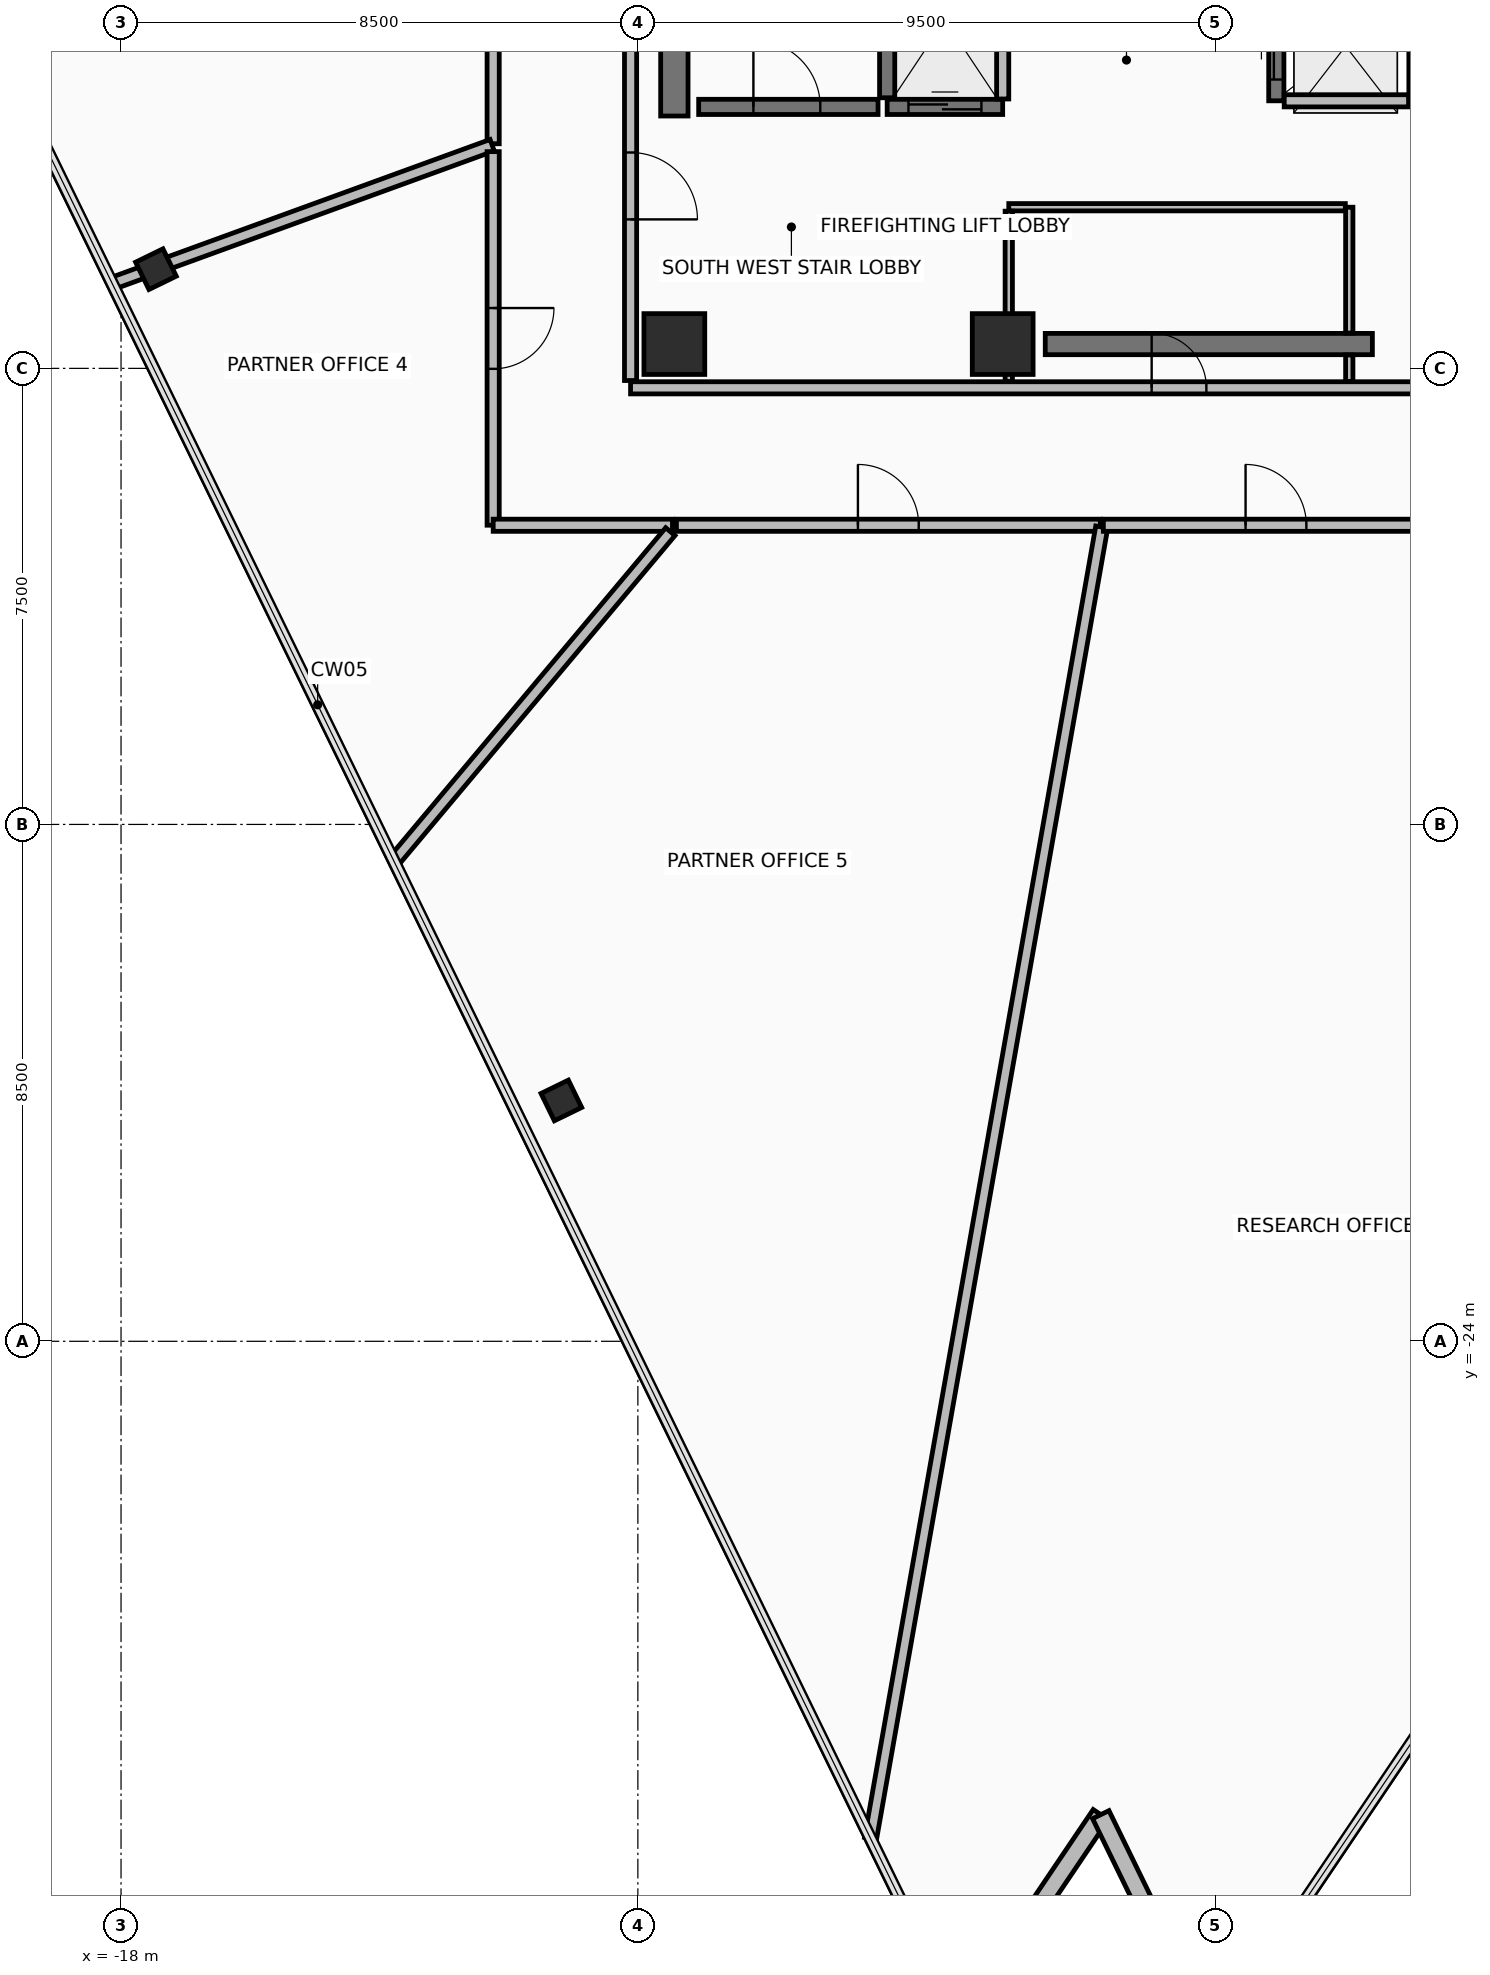
"""IFC4 building model, lengths in metres.
Left out: names, types, materials, properties, quantities, classifications, styles, units other than length and angle.
Written with IfcOpenShell. Run it as: python <this file> out.ifc"""

import sys

from ifc_helpers import new_model, si_unit, direction, frame, frame_2d, origin, origin_2d, place, context, subcontext, project, spatial, rectangle, hollow_rectangle, extrude, element, fill, save


model = new_model("IFC4")
c1 = context("Model", 3, precision=1e-05, world=origin(), true_north=direction((0.0, 1.0)))
c2 = subcontext(c1, "Body", "Model", "MODEL_VIEW")
j1 = project(units=[si_unit("LENGTHUNIT", "METRE"), si_unit("PLANEANGLEUNIT", "RADIAN")], contexts=[c1])
p1 = place(None, origin())
s1 = spatial("IfcSite", under=j1, at=p1, CompositionType="ELEMENT")
p2 = place(p1, origin())
s2 = spatial("IfcBuilding", under=s1, at=p2, CompositionType="ELEMENT")
p3 = place(p2, frame((0.0, 0.0, 237.85)))
s3 = spatial("IfcBuildingStorey", under=s2, at=p3, CompositionType="ELEMENT", Elevation=237.85)
for number, where, z_axis, x_axis in (
    (1, (-8.9, -7.6, 0.0), (0.0, 0.0, 1.0), (1.0, 0.0, 0.0)),
    (2, (-3.5, -7.6, 0.0), (0.0, 0.0, 1.0), (1.0, 0.0, 0.0)),
):
    element("IfcColumn", number, at=place(p3, frame(where, z_axis=z_axis, x_axis=x_axis)), inside=s3, PredefinedType="COLUMN", context=c2, shape_type="SweptSolid", body=[
        extrude(rectangle(XDim=1.0, YDim=1.0, at=origin_2d()), origin(), (0.0, 0.0, 1.0), 3.6),
    ])
for number, where, z_axis, x_axis in (
    (3, (-17.426, -6.369, 0.0), (0.0, 0.0, 1.0), (-0.438, 0.899, 0.0)),
    (4, (-10.758, -20.039, 0.0), (0.0, 0.0, 1.0), (-0.438, 0.899, 0.0)),
):
    element("IfcColumn", number, at=place(p3, frame(where, z_axis=z_axis, x_axis=x_axis)), inside=s3, PredefinedType="COLUMN", context=c2, shape_type="SweptSolid", body=[
        extrude(hollow_rectangle(XDim=0.5, YDim=0.5, WallThickness=0.032, at=origin_2d()), origin(), (0.0, 0.0, 1.0), 3.6),
    ])
p4 = place(p3, frame((-4.195, -35.207, 0.0), z_axis=(0.0, 0.0, 1.0), x_axis=(0.559182319101, 0.829044711704, 0.0)))
e5 = element("IfcWall", 5, at=p4, inside=s3, PredefinedType="STANDARD", context=c2, shape_type="SweptSolid", body=[
    extrude(rectangle(XDim=4.128, YDim=0.3, at=frame_2d((2.064, 0.0))), origin(), (0.0, 0.0, 1.0), 2.765),
])
p5 = place(p3, frame((-1.887, -31.784, 0.0), z_axis=(0.0, 0.0, 1.0), x_axis=(0.438367699713, -0.898795727542, 0.0)))
e6 = element("IfcWall", 6, at=p5, inside=s3, PredefinedType="STANDARD", context=c2, shape_type="SweptSolid", body=[
    extrude(rectangle(XDim=4.128, YDim=0.3, at=frame_2d((2.064, 0.0))), origin(), (0.0, 0.0, 1.0), 2.765),
])
p6 = place(p3, frame((-2.8, -7.6, 0.0), z_axis=(0.0, 0.0, 1.0), x_axis=(1.0, 0.0, 0.0)))
e7 = element("IfcWall", 7, at=p6, inside=s3, PredefinedType="SHEAR", context=c2, shape_type="SweptSolid", body=[
    extrude(rectangle(XDim=5.38, YDim=0.35, at=frame_2d((2.69, 0.0))), origin(), (0.0, 0.0, 1.0), 3.42),
])
p7 = place(p3, frame((-8.9, -3.85, 0.0), z_axis=(0.0, 0.0, 1.0), x_axis=(0.0, 1.0, 0.0)))
e8 = element("IfcWall", 8, at=p7, inside=s3, PredefinedType="SHEAR", context=c2, shape_type="SweptSolid", body=[
    extrude(rectangle(XDim=10.7, YDim=0.45, at=frame_2d((5.35, 0.0))), origin(), (0.0, 0.0, 1.0), 3.42),
])
p8 = place(p3, frame((-9.62, -8.32, 0.0), z_axis=(0.0, 0.0, 1.0), x_axis=(1.0, 0.0, 0.0)))
e9 = element("IfcWall", 9, at=p8, inside=s3, PredefinedType="PARTITIONING", context=c2, shape_type="SweptSolid", body=[
    extrude(rectangle(XDim=19.24, YDim=0.2, at=frame_2d((9.62, 0.0))), origin(), (0.0, 0.0, 1.0), 2.915),
])
p9 = place(p8, frame((8.57, 0.0, 0.0)))
e10 = element("IfcOpeningElement", 10, at=p9, cuts=e9, PredefinedType="OPENING", context=c2, shape_type="SweptSolid", body=[
    extrude(rectangle(XDim=0.9, YDim=2.1, at=frame_2d((0.45, 1.05))), frame((0.0, 0.11, 0.0), z_axis=(0.0, -1.0, 0.0), x_axis=(1.0, 0.0, 0.0)), (0.0, 0.0, 1.0), 0.22),
])
p10 = place(p8, frame((14.045, 0.0, 0.0)))
e11 = element("IfcOpeningElement", 11, at=p10, cuts=e9, PredefinedType="OPENING", context=c2, shape_type="SweptSolid", body=[
    extrude(rectangle(XDim=0.9, YDim=2.1, at=frame_2d((0.45, 1.05))), frame((0.0, 0.11, 0.0), z_axis=(0.0, -1.0, 0.0), x_axis=(1.0, 0.0, 0.0)), (0.0, 0.0, 1.0), 0.22),
])
p11 = place(p8, frame((15.995, 0.0, 0.0)))
e12 = element("IfcOpeningElement", 12, at=p11, cuts=e9, PredefinedType="OPENING", context=c2, shape_type="SweptSolid", body=[
    extrude(rectangle(XDim=0.9, YDim=2.1, at=frame_2d((0.45, 1.05))), frame((0.0, 0.11, 0.0), z_axis=(0.0, -1.0, 0.0), x_axis=(1.0, 0.0, 0.0)), (0.0, 0.0, 1.0), 0.22),
])
p12 = place(p3, frame((-9.62, 8.2, 0.0), z_axis=(0.0, 0.0, 1.0), x_axis=(0.0, -1.0, 0.0)))
e13 = element("IfcWall", 13, at=p12, inside=s3, PredefinedType="PARTITIONING", context=c2, shape_type="SweptSolid", body=[
    extrude(rectangle(XDim=16.4, YDim=0.2, at=frame_2d((8.2, 0.0))), origin(), (0.0, 0.0, 1.0), 2.765),
])
p13 = place(p12, frame((12.65, 0.0, 0.0)))
e14 = element("IfcOpeningElement", 14, at=p13, cuts=e13, PredefinedType="OPENING", context=c2, shape_type="SweptSolid", body=[
    extrude(rectangle(XDim=1.1, YDim=2.15, at=frame_2d((0.55, 1.075))), frame((0.0, 0.11, 0.0), z_axis=(0.0, -1.0, 0.0), x_axis=(1.0, 0.0, 0.0)), (0.0, 0.0, 1.0), 0.22),
])
p14 = place(p3, frame((-5.4, -3.55, 0.0), z_axis=(0.0, 0.0, 1.0), x_axis=(0.0, 1.0, 0.0)))
e15 = element("IfcWall", 15, at=p14, inside=s3, PredefinedType="SHEAR", context=c2, shape_type="SweptSolid", body=[
    extrude(rectangle(XDim=7.3, YDim=0.25, at=frame_2d((3.65, 0.0))), origin(), (0.0, 0.0, 1.0), 3.42),
])
p15 = place(p3, frame((-8.5, -3.7, 0.0), z_axis=(0.0, 0.0, 1.0), x_axis=(1.0, 0.0, 0.0)))
e16 = element("IfcWall", 16, at=p15, inside=s3, PredefinedType="SHEAR", context=c2, shape_type="SweptSolid", body=[
    extrude(rectangle(XDim=2.95, YDim=0.25, at=frame_2d((1.475, 0.0))), origin(), (0.0, 0.0, 1.0), 3.42),
])
p16 = place(p15, frame((0.9, 0.0, 0.0)))
e17 = element("IfcOpeningElement", 17, at=p16, cuts=e16, PredefinedType="OPENING", context=c2, shape_type="SweptSolid", body=[
    extrude(rectangle(XDim=1.1, YDim=2.15, at=frame_2d((0.55, 1.075))), frame((0.0, 0.135, 0.0), z_axis=(0.0, -1.0, 0.0), x_axis=(1.0, 0.0, 0.0)), (0.0, 0.0, 1.0), 0.27),
])
p17 = place(p3, frame((1.0, -3.6, 0.0), z_axis=(0.0, 0.0, 1.0), x_axis=(0.0, 1.0, 0.0)))
e18 = element("IfcWall", 18, at=p17, inside=s3, PredefinedType="SHEAR", context=c2, shape_type="SweptSolid", body=[
    extrude(rectangle(XDim=1.8, YDim=0.25, at=frame_2d((0.9, 0.0))), origin(), (0.0, 0.0, 1.0), 3.42),
])
p18 = place(p17, frame((0.35, 0.0, 0.0)))
e19 = element("IfcOpeningElement", 19, at=p18, cuts=e18, PredefinedType="OPENING", context=c2, shape_type="SweptSolid", body=[
    extrude(rectangle(XDim=1.1, YDim=2.2, at=frame_2d((0.55, 1.1))), frame((0.0, 0.135, 0.0), z_axis=(0.0, -1.0, 0.0), x_axis=(1.0, 0.0, 0.0)), (0.0, 0.0, 1.0), 0.27),
])
p19 = place(p3, frame((3.28, -3.6, 0.0), z_axis=(0.0, 0.0, 1.0), x_axis=(0.0, 1.0, 0.0)))
e20 = element("IfcWall", 20, at=p19, inside=s3, PredefinedType="PARTITIONING", context=c2, shape_type="SweptSolid", body=[
    extrude(rectangle(XDim=1.8, YDim=0.2, at=frame_2d((0.9, 0.0))), origin(), (0.0, 0.0, 1.0), 3.42),
])
p20 = place(p3, frame((1.13, -3.6, 0.0), z_axis=(0.0, 0.0, 1.0), x_axis=(1.0, 0.0, 0.0)))
e21 = element("IfcWall", 21, at=p20, inside=s3, PredefinedType="PARTITIONING", context=c2, shape_type="SweptSolid", body=[
    extrude(rectangle(XDim=2.045, YDim=0.2, at=frame_2d((1.022, 0.0))), origin(), (0.0, 0.0, 1.0), 3.42),
])
p21 = place(p3, frame((-5.4, -3.7, 0.0), z_axis=(0.0, 0.0, 1.0), x_axis=(1.0, 0.0, 0.0)))
e22 = element("IfcWall", 22, at=p21, inside=s3, PredefinedType="SHEAR", context=c2, shape_type="SweptSolid", body=[
    extrude(rectangle(XDim=1.9, YDim=0.25, at=frame_2d((0.95, 0.0))), origin(), (0.0, 0.0, 1.0), 3.42),
])
p22 = place(p21, frame((0.35, 0.0, 0.0)))
e23 = element("IfcOpeningElement", 23, at=p22, cuts=e22, PredefinedType="OPENING", context=c2, shape_type="SweptSolid", body=[
    extrude(rectangle(XDim=1.2, YDim=2.2, at=frame_2d((0.6, 1.1))), frame((0.0, 0.135, 0.0), z_axis=(0.0, -1.0, 0.0), x_axis=(1.0, 0.0, 0.0)), (0.0, 0.0, 1.0), 0.27),
])
p23 = place(p3, frame((-3.5, -3.57, 0.0), z_axis=(0.0, 0.0, 1.0), x_axis=(0.0, 1.0, 0.0)))
e24 = element("IfcWall", 24, at=p23, inside=s3, PredefinedType="PARTITIONING", context=c2, shape_type="SweptSolid", body=[
    extrude(rectangle(XDim=2.615, YDim=0.2, at=frame_2d((1.308, 0.0))), origin(), (0.0, 0.0, 1.0), 3.42),
])
p24 = place(p3, frame((2.2, -8.215, 0.0), z_axis=(0.0, 0.0, 1.0), x_axis=(0.0, 1.0, 0.0)))
e25 = element("IfcWall", 25, at=p24, inside=s3, PredefinedType="PARTITIONING", context=c2, shape_type="SweptSolid", body=[
    extrude(rectangle(XDim=0.435, YDim=0.12, at=frame_2d((0.218, 0.0))), origin(), (0.0, 0.0, 1.0), 2.715),
])
p25 = place(p3, frame((2.2, -7.42, 0.0), z_axis=(0.0, 0.0, 1.0), x_axis=(0.0, 1.0, 0.0)))
e26 = element("IfcWall", 26, at=p25, inside=s3, PredefinedType="PARTITIONING", context=c2, shape_type="SweptSolid", body=[
    extrude(rectangle(XDim=2.07, YDim=0.12, at=frame_2d((1.035, 0.0))), origin(), (0.0, 0.0, 1.0), 2.715),
])
p26 = place(p3, frame((2.135, -5.35, 0.0), z_axis=(0.0, 0.0, 1.0), x_axis=(-1.0, 0.0, 0.0)))
e27 = element("IfcWall", 27, at=p26, inside=s3, PredefinedType="PARTITIONING", context=c2, shape_type="SweptSolid", body=[
    extrude(rectangle(XDim=5.535, YDim=0.12, at=frame_2d((2.768, 0.0))), origin(), (0.0, 0.0, 1.0), 2.715),
])
p27 = place(p3, frame((-3.4, -5.415, 0.0), z_axis=(0.0, 0.0, 1.0), x_axis=(0.0, -1.0, 0.0)))
e28 = element("IfcWall", 28, at=p27, inside=s3, PredefinedType="PARTITIONING", context=c2, shape_type="SweptSolid", body=[
    extrude(rectangle(XDim=2.8, YDim=0.12, at=frame_2d((1.4, 0.0))), origin(), (0.0, 0.0, 1.0), 2.715),
])
p28 = place(p3, frame((-11.88, 1.648, 0.0), z_axis=(0.0, 0.0, 1.0), x_axis=(0.0, -1.0, 0.0)))
e29 = element("IfcWall", 29, at=p28, inside=s3, PredefinedType="PARTITIONING", context=c2, shape_type="SweptSolid", body=[
    extrude(rectangle(XDim=5.954, YDim=0.2, at=frame_2d((2.977, 0.0))), origin(), (0.0, 0.0, 1.0), 3.42),
])
p29 = place(p28, frame((2.477, 0.0, 0.0)))
e30 = element("IfcOpeningElement", 30, at=p29, cuts=e29, PredefinedType="OPENING", context=c2, shape_type="SweptSolid", body=[
    extrude(rectangle(XDim=1.0, YDim=2.15, at=frame_2d((0.5, 1.075))), frame((0.0, 0.11, 0.0), z_axis=(0.0, -1.0, 0.0), x_axis=(1.0, 0.0, 0.0)), (0.0, 0.0, 1.0), 0.22),
])
p30 = place(p3, frame((-11.896, -4.33, 0.0), z_axis=(0.0, 0.0, 1.0), x_axis=(-0.939698738166, -0.342003335495, 0.0)))
e31 = element("IfcWall", 31, at=p30, inside=s3, PredefinedType="PARTITIONING", context=c2, shape_type="SweptSolid", body=[
    extrude(rectangle(XDim=6.627, YDim=0.2, at=frame_2d((3.314, 0.0))), origin(), (0.0, 0.0, 1.0), 2.765),
])
p31 = place(p3, frame((-11.88, -4.436, 0.0), z_axis=(0.0, 0.0, 1.0), x_axis=(0.0, -1.0, 0.0)))
e32 = element("IfcWall", 32, at=p31, inside=s3, PredefinedType="PARTITIONING", context=c2, shape_type="SweptSolid", body=[
    extrude(rectangle(XDim=6.144, YDim=0.2, at=frame_2d((3.072, 0.0))), origin(), (0.0, 0.0, 1.0), 2.915),
])
p32 = place(p31, frame((2.572, 0.0, 0.0)))
e33 = element("IfcOpeningElement", 33, at=p32, cuts=e32, PredefinedType="OPENING", context=c2, shape_type="SweptSolid", body=[
    extrude(rectangle(XDim=1.0, YDim=2.15, at=frame_2d((0.5, 1.075))), frame((0.0, 0.11, 0.0), z_axis=(0.0, -1.0, 0.0), x_axis=(1.0, 0.0, 0.0)), (0.0, 0.0, 1.0), 0.22),
])
p33 = place(p3, frame((-11.879, -10.58, 0.0), z_axis=(0.0, 0.0, 1.0), x_axis=(1.0, 0.0, 0.0)))
e34 = element("IfcWall", 34, at=p33, inside=s3, PredefinedType="PARTITIONING", context=c2, shape_type="SweptSolid", body=[
    extrude(rectangle(XDim=2.948, YDim=0.2, at=frame_2d((1.474, 0.0))), origin(), (0.0, 0.0, 1.0), 2.915),
])
p34 = place(p3, frame((-8.966, -10.685, 0.0), z_axis=(0.0, 0.0, 1.0), x_axis=(-0.642788071203, -0.76604405586, 0.0)))
e35 = element("IfcWall", 35, at=p34, inside=s3, PredefinedType="PARTITIONING", context=c2, shape_type="SweptSolid", body=[
    extrude(rectangle(XDim=7.073, YDim=0.2, at=frame_2d((3.537, 0.0))), origin(), (0.0, 0.0, 1.0), 2.765),
])
p35 = place(p3, frame((-8.866, -10.58, 0.0), z_axis=(0.0, 0.0, 1.0), x_axis=(1.0, 0.0, 0.0)))
e36 = element("IfcWall", 36, at=p35, inside=s3, PredefinedType="PARTITIONING", context=c2, shape_type="SweptSolid", body=[
    extrude(rectangle(XDim=6.971, YDim=0.2, at=frame_2d((3.485, 0.0))), origin(), (0.0, 0.0, 1.0), 2.915),
])
p36 = place(p35, frame((2.985, 0.0, 0.0)))
e37 = element("IfcOpeningElement", 37, at=p36, cuts=e36, PredefinedType="OPENING", context=c2, shape_type="SweptSolid", body=[
    extrude(rectangle(XDim=1.0, YDim=2.15, at=frame_2d((0.5, 1.075))), frame((0.0, 0.11, 0.0), z_axis=(0.0, -1.0, 0.0), x_axis=(1.0, 0.0, 0.0)), (0.0, 0.0, 1.0), 0.22),
])
p37 = place(p3, frame((-1.871, -10.609, 0.0), z_axis=(0.0, 0.0, 1.0), x_axis=(-0.173658771841, -0.984805884915, 0.0)))
e38 = element("IfcWall", 38, at=p37, inside=s3, PredefinedType="PARTITIONING", context=c2, shape_type="SweptSolid", body=[
    extrude(rectangle(XDim=21.899, YDim=0.2, at=frame_2d((10.95, 0.0))), origin(), (0.0, 0.0, 1.0), 2.765),
])
p38 = place(p3, frame((-1.844, -10.58, 0.0), z_axis=(0.0, 0.0, 1.0), x_axis=(1.0, 0.0, 0.0)))
e39 = element("IfcWall", 39, at=p38, inside=s3, PredefinedType="PARTITIONING", context=c2, shape_type="SweptSolid", body=[
    extrude(rectangle(XDim=5.678, YDim=0.2, at=frame_2d((2.839, 0.0))), origin(), (0.0, 0.0, 1.0), 3.42),
])
p39 = place(p38, frame((2.339, 0.0, 0.0)))
e40 = element("IfcOpeningElement", 40, at=p39, cuts=e39, PredefinedType="OPENING", context=c2, shape_type="SweptSolid", body=[
    extrude(rectangle(XDim=1.0, YDim=2.15, at=frame_2d((0.5, 1.075))), frame((0.0, 0.11, 0.0), z_axis=(0.0, -1.0, 0.0), x_axis=(1.0, 0.0, 0.0)), (0.0, 0.0, 1.0), 0.22),
])
p40 = place(p13, frame((1.1, 0.0, 0.0), z_axis=(0.0, 0.0, 1.0), x_axis=(-1.0, 0.0, 0.0)))
e41 = element("IfcDoor", 41, at=p40, inside=s3, OperationType="SINGLE_SWING_LEFT", PredefinedType="DOOR", context=c2, shape_type="SweptSolid", body=[
    extrude(rectangle(XDim=1.1, YDim=2.15, at=frame_2d((0.55, 1.075))), frame((0.0, 0.025, 0.0), z_axis=(0.0, -1.0, 0.0), x_axis=(1.0, 0.0, 0.0)), (0.0, 0.0, 1.0), 0.05),
])
fill(e14, e41)
p41 = place(p16, origin())
e42 = element("IfcDoor", 42, at=p41, inside=s3, OperationType="SINGLE_SWING_LEFT", PredefinedType="DOOR", context=c2, shape_type="SweptSolid", body=[
    extrude(rectangle(XDim=1.1, YDim=2.15, at=frame_2d((0.55, 1.075))), frame((0.0, 0.025, 0.0), z_axis=(0.0, -1.0, 0.0), x_axis=(1.0, 0.0, 0.0)), (0.0, 0.0, 1.0), 0.05),
])
fill(e17, e42)
p42 = place(p18, origin())
e43 = element("IfcDoor", 43, at=p42, inside=s3, OperationType="SLIDING_TO_LEFT", PredefinedType="DOOR", context=c2, shape_type="SweptSolid", body=[
    extrude(rectangle(XDim=1.1, YDim=2.2, at=frame_2d((0.55, 1.1))), frame((0.0, 0.025, 0.0), z_axis=(0.0, -1.0, 0.0), x_axis=(1.0, 0.0, 0.0)), (0.0, 0.0, 1.0), 0.05),
])
fill(e19, e43)
p43 = place(p22, origin())
e44 = element("IfcDoor", 44, at=p43, inside=s3, OperationType="SLIDING_TO_RIGHT", PredefinedType="DOOR", context=c2, shape_type="SweptSolid", body=[
    extrude(rectangle(XDim=1.2, YDim=2.2, at=frame_2d((0.6, 1.1))), frame((0.0, 0.025, 0.0), z_axis=(0.0, -1.0, 0.0), x_axis=(1.0, 0.0, 0.0)), (0.0, 0.0, 1.0), 0.05),
])
fill(e23, e44)
p44 = place(p9, origin())
e45 = element("IfcDoor", 45, at=p44, inside=s3, OperationType="SINGLE_SWING_LEFT", PredefinedType="DOOR", context=c2, shape_type="SweptSolid", body=[
    extrude(rectangle(XDim=0.9, YDim=2.1, at=frame_2d((0.45, 1.05))), frame((0.0, 0.025, 0.0), z_axis=(0.0, -1.0, 0.0), x_axis=(1.0, 0.0, 0.0)), (0.0, 0.0, 1.0), 0.05),
])
fill(e10, e45)
p45 = place(p32, origin())
e46 = element("IfcDoor", 46, at=p45, inside=s3, OperationType="SINGLE_SWING_RIGHT", PredefinedType="DOOR", context=c2, shape_type="SweptSolid", body=[
    extrude(rectangle(XDim=1.0, YDim=2.15, at=frame_2d((0.5, 1.075))), frame((0.0, 0.025, 0.0), z_axis=(0.0, -1.0, 0.0), x_axis=(1.0, 0.0, 0.0)), (0.0, 0.0, 1.0), 0.05),
])
fill(e33, e46)
p46 = place(p36, origin())
e47 = element("IfcDoor", 47, at=p46, inside=s3, OperationType="SINGLE_SWING_RIGHT", PredefinedType="DOOR", context=c2, shape_type="SweptSolid", body=[
    extrude(rectangle(XDim=1.0, YDim=2.15, at=frame_2d((0.5, 1.075))), frame((0.0, 0.025, 0.0), z_axis=(0.0, -1.0, 0.0), x_axis=(1.0, 0.0, 0.0)), (0.0, 0.0, 1.0), 0.05),
])
fill(e37, e47)
p47 = place(p39, origin())
e48 = element("IfcDoor", 48, at=p47, inside=s3, OperationType="SINGLE_SWING_RIGHT", PredefinedType="DOOR", context=c2, shape_type="SweptSolid", body=[
    extrude(rectangle(XDim=1.0, YDim=2.15, at=frame_2d((0.5, 1.075))), frame((0.0, 0.025, 0.0), z_axis=(0.0, -1.0, 0.0), x_axis=(1.0, 0.0, 0.0)), (0.0, 0.0, 1.0), 0.05),
])
fill(e40, e48)
save(model, sys.argv[1])
